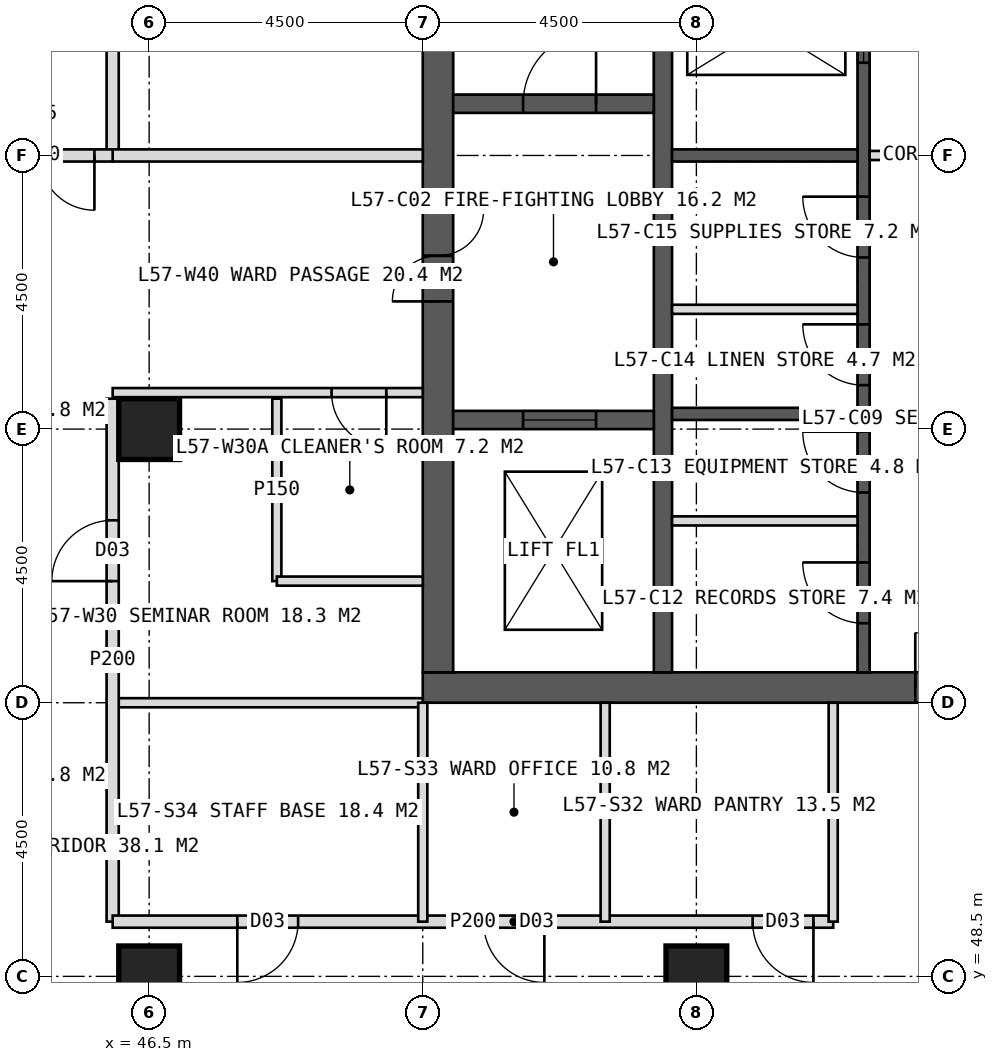
"""IFC4 building model, lengths in metres.
Left out: names, types, materials, properties, quantities, classifications, styles, units other than length and angle.
Written with IfcOpenShell. Run it as: python <this file> out.ifc"""

import sys

from ifc_helpers import new_model, si_unit, direction, frame, frame_2d, origin, origin_2d, place, context, subcontext, project, spatial, rectangle, hollow_rectangle, extrude, element, fill, save


model = new_model("IFC4")
c1 = context("Model", 3, precision=1e-05, world=origin(), true_north=direction((0.0, 1.0)))
c2 = subcontext(c1, "Body", "Model", "MODEL_VIEW")
j1 = project(units=[si_unit("LENGTHUNIT", "METRE"), si_unit("PLANEANGLEUNIT", "RADIAN")], contexts=[c1])
p1 = place(None, origin())
s1 = spatial("IfcSite", under=j1, at=p1, CompositionType="ELEMENT")
p2 = place(p1, origin())
s2 = spatial("IfcBuilding", under=s1, at=p2, CompositionType="ELEMENT")
p3 = place(p2, frame((0.0, 0.0, 237.0)))
s3 = spatial("IfcBuildingStorey", under=s2, at=p3, CompositionType="ELEMENT", Elevation=237.0)
p4 = place(p3, frame((51.0, 53.25, 0.0), z_axis=(0.0, 0.0, 1.0), x_axis=(1.0, 0.0, 0.0)))
e1 = element("IfcWall", 1, at=p4, inside=s3, PredefinedType="SHEAR", context=c2, shape_type="SweptSolid", body=[
    extrude(rectangle(XDim=18.0, YDim=0.5, at=frame_2d((9.0, 0.0))), origin(), (0.0, 0.0, 1.0), 4.0),
])
p5 = place(p4, frame((8.1, 0.0, 0.0)))
e2 = element("IfcOpeningElement", 2, at=p5, cuts=e1, PredefinedType="OPENING", context=c2, shape_type="SweptSolid", body=[
    extrude(rectangle(XDim=1.8, YDim=2.2, at=frame_2d((0.9, 1.1))), frame((0.0, 0.26, 0.0), z_axis=(0.0, -1.0, 0.0), x_axis=(1.0, 0.0, 0.0)), (0.0, 0.0, 1.0), 0.52),
])
p6 = place(p3, frame((51.25, 53.5, 0.0), z_axis=(0.0, 0.0, 1.0), x_axis=(0.0, 1.0, 0.0)))
e3 = element("IfcWall", 3, at=p6, inside=s3, PredefinedType="SHEAR", context=c2, shape_type="SweptSolid", body=[
    extrude(rectangle(XDim=17.0, YDim=0.5, at=frame_2d((8.5, 0.0))), origin(), (0.0, 0.0, 1.0), 4.0),
])
p7 = place(p6, frame((6.1, 0.0, 0.0)))
e4 = element("IfcOpeningElement", 4, at=p7, cuts=e3, PredefinedType="OPENING", context=c2, shape_type="SweptSolid", body=[
    extrude(rectangle(XDim=1.5, YDim=2.2, at=frame_2d((0.75, 1.1))), frame((0.0, 0.26, 0.0), z_axis=(0.0, -1.0, 0.0), x_axis=(1.0, 0.0, 0.0)), (0.0, 0.0, 1.0), 0.52),
])
p8 = place(p3, frame((54.95, 53.5, 0.0), z_axis=(0.0, 0.0, 1.0), x_axis=(0.0, 1.0, 0.0)))
e5 = element("IfcWall", 5, at=p8, inside=s3, PredefinedType="SHEAR", context=c2, shape_type="SweptSolid", body=[
    extrude(rectangle(XDim=17.0, YDim=0.3, at=frame_2d((8.5, 0.0))), origin(), (0.0, 0.0, 1.0), 4.0),
])
p9 = place(p3, frame((58.25, 53.5, 0.0), z_axis=(0.0, 0.0, 1.0), x_axis=(0.0, 1.0, 0.0)))
e6 = element("IfcWall", 6, at=p9, inside=s3, PredefinedType="SHEAR", context=c2, shape_type="SweptSolid", body=[
    extrude(rectangle(XDim=17.0, YDim=0.2, at=frame_2d((8.5, 0.0))), origin(), (0.0, 0.0, 1.0), 4.0),
])
p10 = place(p9, frame((0.808, 0.0, 0.0)))
e7 = element("IfcOpeningElement", 7, at=p10, cuts=e6, PredefinedType="OPENING", context=c2, shape_type="SweptSolid", body=[
    extrude(rectangle(XDim=1.0, YDim=2.1, at=frame_2d((0.5, 1.05))), frame((0.0, 0.11, 0.0), z_axis=(0.0, -1.0, 0.0), x_axis=(1.0, 0.0, 0.0)), (0.0, 0.0, 1.0), 0.22),
])
p11 = place(p9, frame((2.958, 0.0, 0.0)))
e8 = element("IfcOpeningElement", 8, at=p11, cuts=e6, PredefinedType="OPENING", context=c2, shape_type="SweptSolid", body=[
    extrude(rectangle(XDim=1.0, YDim=2.1, at=frame_2d((0.5, 1.05))), frame((0.0, 0.11, 0.0), z_axis=(0.0, -1.0, 0.0), x_axis=(1.0, 0.0, 0.0)), (0.0, 0.0, 1.0), 0.22),
])
p12 = place(p9, frame((4.722, 0.0, 0.0)))
e9 = element("IfcOpeningElement", 9, at=p12, cuts=e6, PredefinedType="OPENING", context=c2, shape_type="SweptSolid", body=[
    extrude(rectangle(XDim=1.0, YDim=2.1, at=frame_2d((0.5, 1.05))), frame((0.0, 0.11, 0.0), z_axis=(0.0, -1.0, 0.0), x_axis=(1.0, 0.0, 0.0)), (0.0, 0.0, 1.0), 0.22),
])
p13 = place(p9, frame((6.823, 0.0, 0.0)))
e10 = element("IfcOpeningElement", 10, at=p13, cuts=e6, PredefinedType="OPENING", context=c2, shape_type="SweptSolid", body=[
    extrude(rectangle(XDim=1.0, YDim=2.1, at=frame_2d((0.5, 1.05))), frame((0.0, 0.11, 0.0), z_axis=(0.0, -1.0, 0.0), x_axis=(1.0, 0.0, 0.0)), (0.0, 0.0, 1.0), 0.22),
])
p14 = place(p9, frame((10.025, 0.0, 0.0)))
e11 = element("IfcOpeningElement", 11, at=p14, cuts=e6, PredefinedType="OPENING", context=c2, shape_type="SweptSolid", body=[
    extrude(rectangle(XDim=1.4, YDim=2.2, at=frame_2d((0.7, 1.1))), frame((0.0, 0.11, 0.0), z_axis=(0.0, -1.0, 0.0), x_axis=(1.0, 0.0, 0.0)), (0.0, 0.0, 1.0), 0.22),
])
p15 = place(p9, frame((14.325, 0.0, 0.0)))
e12 = element("IfcOpeningElement", 12, at=p15, cuts=e6, PredefinedType="OPENING", context=c2, shape_type="SweptSolid", body=[
    extrude(rectangle(XDim=1.4, YDim=2.2, at=frame_2d((0.7, 1.1))), frame((0.0, 0.11, 0.0), z_axis=(0.0, -1.0, 0.0), x_axis=(1.0, 0.0, 0.0)), (0.0, 0.0, 1.0), 0.22),
])
for number, where, z_axis, x_axis in (
    (13, (55.1, 57.75, 0.0), (0.0, 0.0, 1.0), (1.0, 0.0, 0.0)),
    (14, (55.1, 62.0, 0.0), (0.0, 0.0, 1.0), (1.0, 0.0, 0.0)),
):
    element("IfcWall", number, at=place(p3, frame(where, z_axis=z_axis, x_axis=x_axis)), inside=s3, PredefinedType="SHEAR", context=c2, shape_type="SweptSolid", body=[
        extrude(rectangle(XDim=3.05, YDim=0.2, at=frame_2d((1.525, 0.0))), origin(), (0.0, 0.0, 1.0), 4.0),
    ])
p16 = place(p3, frame((51.5, 62.85, 0.0), z_axis=(0.0, 0.0, 1.0), x_axis=(1.0, 0.0, 0.0)))
e15 = element("IfcWall", 15, at=p16, inside=s3, PredefinedType="SHEAR", context=c2, shape_type="SweptSolid", body=[
    extrude(rectangle(XDim=3.3, YDim=0.3, at=frame_2d((1.65, 0.0))), origin(), (0.0, 0.0, 1.0), 4.0),
])
p17 = place(p16, frame((1.15, 0.0, 0.0)))
e16 = element("IfcOpeningElement", 16, at=p17, cuts=e15, PredefinedType="OPENING", context=c2, shape_type="SweptSolid", body=[
    extrude(rectangle(XDim=1.2, YDim=2.1, at=frame_2d((0.6, 1.05))), frame((0.0, 0.16, 0.0), z_axis=(0.0, -1.0, 0.0), x_axis=(1.0, 0.0, 0.0)), (0.0, 0.0, 1.0), 0.32),
])
p18 = place(p3, frame((51.5, 57.65, 0.0), z_axis=(0.0, 0.0, 1.0), x_axis=(1.0, 0.0, 0.0)))
e17 = element("IfcWall", 17, at=p18, inside=s3, PredefinedType="SHEAR", context=c2, shape_type="SweptSolid", body=[
    extrude(rectangle(XDim=3.3, YDim=0.3, at=frame_2d((1.65, 0.0))), origin(), (0.0, 0.0, 1.0), 4.0),
])
p19 = place(p18, frame((1.15, 0.0, 0.0)))
e18 = element("IfcOpeningElement", 18, at=p19, cuts=e17, PredefinedType="OPENING", context=c2, shape_type="SweptSolid", body=[
    extrude(rectangle(XDim=1.2, YDim=2.2, at=frame_2d((0.6, 1.1))), frame((0.0, 0.16, 0.0), z_axis=(0.0, -1.0, 0.0), x_axis=(1.0, 0.0, 0.0)), (0.0, 0.0, 1.0), 0.32),
])
for number, where, z_axis, x_axis in (
    (19, (46.5, 48.5, 0.0), (0.0, 0.0, 1.0), (1.0, 0.0, 0.0)),
    (20, (55.5, 48.5, 0.0), (0.0, 0.0, 1.0), (1.0, 0.0, 0.0)),
    (21, (46.5, 57.5, 0.0), (0.0, 0.0, 1.0), (1.0, 0.0, 0.0)),
):
    element("IfcColumn", number, at=place(p3, frame(where, z_axis=z_axis, x_axis=x_axis)), inside=s3, PredefinedType="COLUMN", context=c2, shape_type="SweptSolid", body=[
        extrude(hollow_rectangle(XDim=1.0, YDim=1.0, WallThickness=0.1, at=origin_2d()), origin(), (0.0, 0.0, 1.0), 4.0),
    ])
p20 = place(p3, frame((51.0, 53.0, 0.0), z_axis=(0.0, 0.0, 1.0), x_axis=(-1.0, 0.0, 0.0)))
e22 = element("IfcWall", 22, at=p20, inside=s3, PredefinedType="PARTITIONING", context=c2, shape_type="SweptSolid", body=[
    extrude(rectangle(XDim=5.1, YDim=0.15, at=frame_2d((2.55, 0.0))), origin(), (0.0, 0.0, 1.0), 3.75),
])
p21 = place(p3, frame((45.9, 49.4, 0.0), z_axis=(0.0, 0.0, 1.0), x_axis=(0.0, 1.0, 0.0)))
e23 = element("IfcWall", 23, at=p21, inside=s3, PredefinedType="PARTITIONING", context=c2, shape_type="SweptSolid", body=[
    extrude(rectangle(XDim=8.6, YDim=0.2, at=frame_2d((4.3, 0.0))), origin(), (0.0, 0.0, 1.0), 3.75),
])
p22 = place(p21, frame((5.6, 0.0, 0.0)))
e24 = element("IfcOpeningElement", 24, at=p22, cuts=e23, PredefinedType="OPENING", context=c2, shape_type="SweptSolid", body=[
    extrude(rectangle(XDim=1.0, YDim=2.1, at=frame_2d((0.5, 1.05))), frame((0.0, 0.11, 0.0), z_axis=(0.0, -1.0, 0.0), x_axis=(1.0, 0.0, 0.0)), (0.0, 0.0, 1.0), 0.22),
])
p23 = place(p3, frame((45.9, 62.0, 0.0), z_axis=(0.0, 0.0, 1.0), x_axis=(0.0, 1.0, 0.0)))
e25 = element("IfcWall", 25, at=p23, inside=s3, PredefinedType="PARTITIONING", context=c2, shape_type="SweptSolid", body=[
    extrude(rectangle(XDim=14.1, YDim=0.2, at=frame_2d((7.05, 0.0))), origin(), (0.0, 0.0, 1.0), 3.75),
])
p24 = place(p23, frame((2.5, 0.0, 0.0)))
e26 = element("IfcOpeningElement", 26, at=p24, cuts=e25, PredefinedType="OPENING", context=c2, shape_type="SweptSolid", body=[
    extrude(rectangle(XDim=1.0, YDim=2.1, at=frame_2d((0.5, 1.05))), frame((0.0, 0.11, 0.0), z_axis=(0.0, -1.0, 0.0), x_axis=(1.0, 0.0, 0.0)), (0.0, 0.0, 1.0), 0.22),
])
p25 = place(p23, frame((7.0, 0.0, 0.0)))
e27 = element("IfcOpeningElement", 27, at=p25, cuts=e25, PredefinedType="OPENING", context=c2, shape_type="SweptSolid", body=[
    extrude(rectangle(XDim=1.0, YDim=2.1, at=frame_2d((0.5, 1.05))), frame((0.0, 0.11, 0.0), z_axis=(0.0, -1.0, 0.0), x_axis=(1.0, 0.0, 0.0)), (0.0, 0.0, 1.0), 0.22),
])
p26 = place(p23, frame((11.05, 0.0, 0.0)))
e28 = element("IfcOpeningElement", 28, at=p26, cuts=e25, PredefinedType="OPENING", context=c2, shape_type="SweptSolid", body=[
    extrude(rectangle(XDim=1.0, YDim=2.1, at=frame_2d((0.5, 1.05))), frame((0.0, 0.11, 0.0), z_axis=(0.0, -1.0, 0.0), x_axis=(1.0, 0.0, 0.0)), (0.0, 0.0, 1.0), 0.22),
])
p27 = place(p3, frame((51.0, 58.1, 0.0), z_axis=(0.0, 0.0, 1.0), x_axis=(-1.0, 0.0, 0.0)))
e29 = element("IfcWall", 29, at=p27, inside=s3, PredefinedType="PARTITIONING", context=c2, shape_type="SweptSolid", body=[
    extrude(rectangle(XDim=5.1, YDim=0.15, at=frame_2d((2.55, 0.0))), origin(), (0.0, 0.0, 1.0), 3.75),
])
p28 = place(p27, frame((0.6, 0.0, 0.0)))
e30 = element("IfcOpeningElement", 30, at=p28, cuts=e29, PredefinedType="OPENING", context=c2, shape_type="SweptSolid", body=[
    extrude(rectangle(XDim=0.9, YDim=2.1, at=frame_2d((0.45, 1.05))), frame((0.0, 0.085, 0.0), z_axis=(0.0, -1.0, 0.0), x_axis=(1.0, 0.0, 0.0)), (0.0, 0.0, 1.0), 0.17),
])
p29 = place(p3, frame((51.0, 62.0, 0.0), z_axis=(0.0, 0.0, 1.0), x_axis=(-1.0, 0.0, 0.0)))
e31 = element("IfcWall", 31, at=p29, inside=s3, PredefinedType="SOLIDWALL", context=c2, shape_type="SweptSolid", body=[
    extrude(rectangle(XDim=5.1, YDim=0.2, at=frame_2d((2.55, 0.0))), origin(), (0.0, 0.0, 1.0), 2.95),
])
p30 = place(p3, frame((48.6, 55.0, 0.0), z_axis=(0.0, 0.0, 1.0), x_axis=(0.0, 1.0, 0.0)))
e32 = element("IfcWall", 32, at=p30, inside=s3, PredefinedType="PARTITIONING", context=c2, shape_type="SweptSolid", body=[
    extrude(rectangle(XDim=3.0, YDim=0.15, at=frame_2d((1.5, 0.0))), origin(), (0.0, 0.0, 1.0), 3.75),
])
p31 = place(p3, frame((51.0, 55.0, 0.0), z_axis=(0.0, 0.0, 1.0), x_axis=(-1.0, 0.0, 0.0)))
e33 = element("IfcWall", 33, at=p31, inside=s3, PredefinedType="PARTITIONING", context=c2, shape_type="SweptSolid", body=[
    extrude(rectangle(XDim=2.4, YDim=0.15, at=frame_2d((1.2, 0.0))), origin(), (0.0, 0.0, 1.0), 3.75),
])
p32 = place(p3, frame((57.75, 49.4, 0.0), z_axis=(0.0, 0.0, 1.0), x_axis=(-1.0, 0.0, 0.0)))
e34 = element("IfcWall", 34, at=p32, inside=s3, PredefinedType="PARTITIONING", context=c2, shape_type="SweptSolid", body=[
    extrude(rectangle(XDim=11.85, YDim=0.2, at=frame_2d((5.925, 0.0))), origin(), (0.0, 0.0, 1.0), 3.75),
])
p33 = place(p32, frame((0.325, 0.0, 0.0)))
e35 = element("IfcOpeningElement", 35, at=p33, cuts=e34, PredefinedType="OPENING", context=c2, shape_type="SweptSolid", body=[
    extrude(rectangle(XDim=1.0, YDim=2.1, at=frame_2d((0.5, 1.05))), frame((0.0, 0.11, 0.0), z_axis=(0.0, -1.0, 0.0), x_axis=(1.0, 0.0, 0.0)), (0.0, 0.0, 1.0), 0.22),
])
p34 = place(p32, frame((4.75, 0.0, 0.0)))
e36 = element("IfcOpeningElement", 36, at=p34, cuts=e34, PredefinedType="OPENING", context=c2, shape_type="SweptSolid", body=[
    extrude(rectangle(XDim=1.0, YDim=2.1, at=frame_2d((0.5, 1.05))), frame((0.0, 0.11, 0.0), z_axis=(0.0, -1.0, 0.0), x_axis=(1.0, 0.0, 0.0)), (0.0, 0.0, 1.0), 0.22),
])
p35 = place(p32, frame((8.8, 0.0, 0.0)))
e37 = element("IfcOpeningElement", 37, at=p35, cuts=e34, PredefinedType="OPENING", context=c2, shape_type="SweptSolid", body=[
    extrude(rectangle(XDim=1.0, YDim=2.1, at=frame_2d((0.5, 1.05))), frame((0.0, 0.11, 0.0), z_axis=(0.0, -1.0, 0.0), x_axis=(1.0, 0.0, 0.0)), (0.0, 0.0, 1.0), 0.22),
])
for number, where, z_axis, x_axis in (
    (38, (57.75, 53.0, 0.0), (0.0, 0.0, 1.0), (0.0, -1.0, 0.0)),
    (39, (54.0, 53.0, 0.0), (0.0, 0.0, 1.0), (0.0, -1.0, 0.0)),
    (40, (51.0, 53.0, 0.0), (0.0, 0.0, 1.0), (0.0, -1.0, 0.0)),
):
    element("IfcWall", number, at=place(p3, frame(where, z_axis=z_axis, x_axis=x_axis)), inside=s3, PredefinedType="PARTITIONING", context=c2, shape_type="SweptSolid", body=[
        extrude(rectangle(XDim=3.6, YDim=0.15, at=frame_2d((1.8, 0.0))), origin(), (0.0, 0.0, 1.0), 3.75),
    ])
p36 = place(p3, frame((45.9, 62.0, 0.0), z_axis=(0.0, 0.0, 1.0), x_axis=(-1.0, 0.0, 0.0)))
e41 = element("IfcWall", 41, at=p36, inside=s3, PredefinedType="SOLIDWALL", context=c2, shape_type="SweptSolid", body=[
    extrude(rectangle(XDim=2.7, YDim=0.2, at=frame_2d((1.35, 0.0))), origin(), (0.0, 0.0, 1.0), 2.95),
])
p37 = place(p36, frame((0.3, 0.0, 0.0)))
e42 = element("IfcOpeningElement", 42, at=p37, cuts=e41, PredefinedType="OPENING", context=c2, shape_type="SweptSolid", body=[
    extrude(rectangle(XDim=1.8, YDim=2.2, at=frame_2d((0.9, 1.1))), frame((0.0, 0.11, 0.0), z_axis=(0.0, -1.0, 0.0), x_axis=(1.0, 0.0, 0.0)), (0.0, 0.0, 1.0), 0.22),
])
for number, where, z_axis, x_axis in (
    (43, (55.1, 55.99, 0.0), (0.0, 0.0, 1.0), (1.0, 0.0, 0.0)),
    (44, (55.1, 59.47, 0.0), (0.0, 0.0, 1.0), (1.0, 0.0, 0.0)),
):
    element("IfcWall", number, at=place(p3, frame(where, z_axis=z_axis, x_axis=x_axis)), inside=s3, PredefinedType="PARTITIONING", context=c2, shape_type="SweptSolid", body=[
        extrude(rectangle(XDim=3.05, YDim=0.15, at=frame_2d((1.525, 0.0))), origin(), (0.0, 0.0, 1.0), 3.75),
    ])
p38 = place(p3, frame((58.35, 62.0, 0.0), z_axis=(0.0, 0.0, 1.0), x_axis=(1.0, 0.0, 0.0)))
e45 = element("IfcWall", 45, at=p38, inside=s3, PredefinedType="PARTITIONING", context=c2, shape_type="SweptSolid", body=[
    extrude(rectangle(XDim=3.3, YDim=0.15, at=frame_2d((1.65, 0.0))), origin(), (0.0, 0.0, 1.0), 3.75),
])
p39 = place(p28, origin())
e46 = element("IfcDoor", 46, at=p39, inside=s3, OperationType="SINGLE_SWING_LEFT", PredefinedType="DOOR", context=c2, shape_type="SweptSolid", body=[
    extrude(rectangle(XDim=0.9, YDim=2.1, at=frame_2d((0.45, 1.05))), frame((0.0, 0.025, 0.0), z_axis=(0.0, -1.0, 0.0), x_axis=(1.0, 0.0, 0.0)), (0.0, 0.0, 1.0), 0.05),
])
fill(e30, e46)
p40 = place(p22, origin())
e47 = element("IfcDoor", 47, at=p40, inside=s3, OperationType="SINGLE_SWING_LEFT", PredefinedType="DOOR", context=c2, shape_type="SweptSolid", body=[
    extrude(rectangle(XDim=1.0, YDim=2.1, at=frame_2d((0.5, 1.05))), frame((0.0, 0.025, 0.0), z_axis=(0.0, -1.0, 0.0), x_axis=(1.0, 0.0, 0.0)), (0.0, 0.0, 1.0), 0.05),
])
fill(e24, e47)
p41 = place(p33, origin())
e48 = element("IfcDoor", 48, at=p41, inside=s3, OperationType="SINGLE_SWING_LEFT", PredefinedType="DOOR", context=c2, shape_type="SweptSolid", body=[
    extrude(rectangle(XDim=1.0, YDim=2.1, at=frame_2d((0.5, 1.05))), frame((0.0, 0.025, 0.0), z_axis=(0.0, -1.0, 0.0), x_axis=(1.0, 0.0, 0.0)), (0.0, 0.0, 1.0), 0.05),
])
fill(e35, e48)
p42 = place(p34, origin())
e49 = element("IfcDoor", 49, at=p42, inside=s3, OperationType="SINGLE_SWING_LEFT", PredefinedType="DOOR", context=c2, shape_type="SweptSolid", body=[
    extrude(rectangle(XDim=1.0, YDim=2.1, at=frame_2d((0.5, 1.05))), frame((0.0, 0.025, 0.0), z_axis=(0.0, -1.0, 0.0), x_axis=(1.0, 0.0, 0.0)), (0.0, 0.0, 1.0), 0.05),
])
fill(e36, e49)
p43 = place(p35, origin())
e50 = element("IfcDoor", 50, at=p43, inside=s3, OperationType="SINGLE_SWING_RIGHT", PredefinedType="DOOR", context=c2, shape_type="SweptSolid", body=[
    extrude(rectangle(XDim=1.0, YDim=2.1, at=frame_2d((0.5, 1.05))), frame((0.0, 0.025, 0.0), z_axis=(0.0, -1.0, 0.0), x_axis=(1.0, 0.0, 0.0)), (0.0, 0.0, 1.0), 0.05),
])
fill(e37, e50)
p44 = place(p37, origin())
e51 = element("IfcDoor", 51, at=p44, inside=s3, OperationType="DOUBLE_DOOR_DOUBLE_SWING", PredefinedType="DOOR", context=c2, shape_type="SweptSolid", body=[
    extrude(rectangle(XDim=1.8, YDim=2.2, at=frame_2d((0.9, 1.1))), frame((0.0, 0.025, 0.0), z_axis=(0.0, -1.0, 0.0), x_axis=(1.0, 0.0, 0.0)), (0.0, 0.0, 1.0), 0.05),
])
fill(e42, e51)
p45 = place(p7, origin())
e52 = element("IfcDoor", 52, at=p45, inside=s3, OperationType="DOUBLE_DOOR_SINGLE_SWING", PredefinedType="DOOR", context=c2, shape_type="SweptSolid", body=[
    extrude(rectangle(XDim=1.5, YDim=2.2, at=frame_2d((0.75, 1.1))), frame((0.0, 0.025, 0.0), z_axis=(0.0, -1.0, 0.0), x_axis=(1.0, 0.0, 0.0)), (0.0, 0.0, 1.0), 0.05),
])
fill(e4, e52)
p46 = place(p17, origin())
e53 = element("IfcDoor", 53, at=p46, inside=s3, OperationType="SINGLE_SWING_RIGHT", PredefinedType="DOOR", context=c2, shape_type="SweptSolid", body=[
    extrude(rectangle(XDim=1.2, YDim=2.1, at=frame_2d((0.6, 1.05))), frame((0.0, 0.025, 0.0), z_axis=(0.0, -1.0, 0.0), x_axis=(1.0, 0.0, 0.0)), (0.0, 0.0, 1.0), 0.05),
])
fill(e16, e53)
p47 = place(p19, origin())
e54 = element("IfcDoor", 54, at=p47, inside=s3, OperationType="SLIDING_TO_LEFT", PredefinedType="DOOR", context=c2, shape_type="SweptSolid", body=[
    extrude(rectangle(XDim=1.2, YDim=2.2, at=frame_2d((0.6, 1.1))), frame((0.0, 0.025, 0.0), z_axis=(0.0, -1.0, 0.0), x_axis=(1.0, 0.0, 0.0)), (0.0, 0.0, 1.0), 0.05),
])
fill(e18, e54)
p48 = place(p10, origin())
e55 = element("IfcDoor", 55, at=p48, inside=s3, OperationType="SINGLE_SWING_RIGHT", PredefinedType="DOOR", context=c2, shape_type="SweptSolid", body=[
    extrude(rectangle(XDim=1.0, YDim=2.1, at=frame_2d((0.5, 1.05))), frame((0.0, 0.025, 0.0), z_axis=(0.0, -1.0, 0.0), x_axis=(1.0, 0.0, 0.0)), (0.0, 0.0, 1.0), 0.05),
])
fill(e7, e55)
p49 = place(p11, origin())
e56 = element("IfcDoor", 56, at=p49, inside=s3, OperationType="SINGLE_SWING_RIGHT", PredefinedType="DOOR", context=c2, shape_type="SweptSolid", body=[
    extrude(rectangle(XDim=1.0, YDim=2.1, at=frame_2d((0.5, 1.05))), frame((0.0, 0.025, 0.0), z_axis=(0.0, -1.0, 0.0), x_axis=(1.0, 0.0, 0.0)), (0.0, 0.0, 1.0), 0.05),
])
fill(e8, e56)
p50 = place(p12, origin())
e57 = element("IfcDoor", 57, at=p50, inside=s3, OperationType="SINGLE_SWING_RIGHT", PredefinedType="DOOR", context=c2, shape_type="SweptSolid", body=[
    extrude(rectangle(XDim=1.0, YDim=2.1, at=frame_2d((0.5, 1.05))), frame((0.0, 0.025, 0.0), z_axis=(0.0, -1.0, 0.0), x_axis=(1.0, 0.0, 0.0)), (0.0, 0.0, 1.0), 0.05),
])
fill(e9, e57)
p51 = place(p13, origin())
e58 = element("IfcDoor", 58, at=p51, inside=s3, OperationType="SINGLE_SWING_RIGHT", PredefinedType="DOOR", context=c2, shape_type="SweptSolid", body=[
    extrude(rectangle(XDim=1.0, YDim=2.1, at=frame_2d((0.5, 1.05))), frame((0.0, 0.025, 0.0), z_axis=(0.0, -1.0, 0.0), x_axis=(1.0, 0.0, 0.0)), (0.0, 0.0, 1.0), 0.05),
])
fill(e10, e58)
p52 = place(p14, origin())
e59 = element("IfcDoor", 59, at=p52, inside=s3, OperationType="SLIDING_TO_LEFT", PredefinedType="DOOR", context=c2, shape_type="SweptSolid", body=[
    extrude(rectangle(XDim=1.4, YDim=2.2, at=frame_2d((0.7, 1.1))), frame((0.0, 0.025, 0.0), z_axis=(0.0, -1.0, 0.0), x_axis=(1.0, 0.0, 0.0)), (0.0, 0.0, 1.0), 0.05),
])
fill(e11, e59)
p53 = place(p5, origin())
e60 = element("IfcDoor", 60, at=p53, inside=s3, OperationType="DOUBLE_DOOR_SINGLE_SWING", PredefinedType="DOOR", context=c2, shape_type="SweptSolid", body=[
    extrude(rectangle(XDim=1.8, YDim=2.2, at=frame_2d((0.9, 1.1))), frame((0.0, 0.025, 0.0), z_axis=(0.0, -1.0, 0.0), x_axis=(1.0, 0.0, 0.0)), (0.0, 0.0, 1.0), 0.05),
])
fill(e2, e60)
save(model, sys.argv[1])
